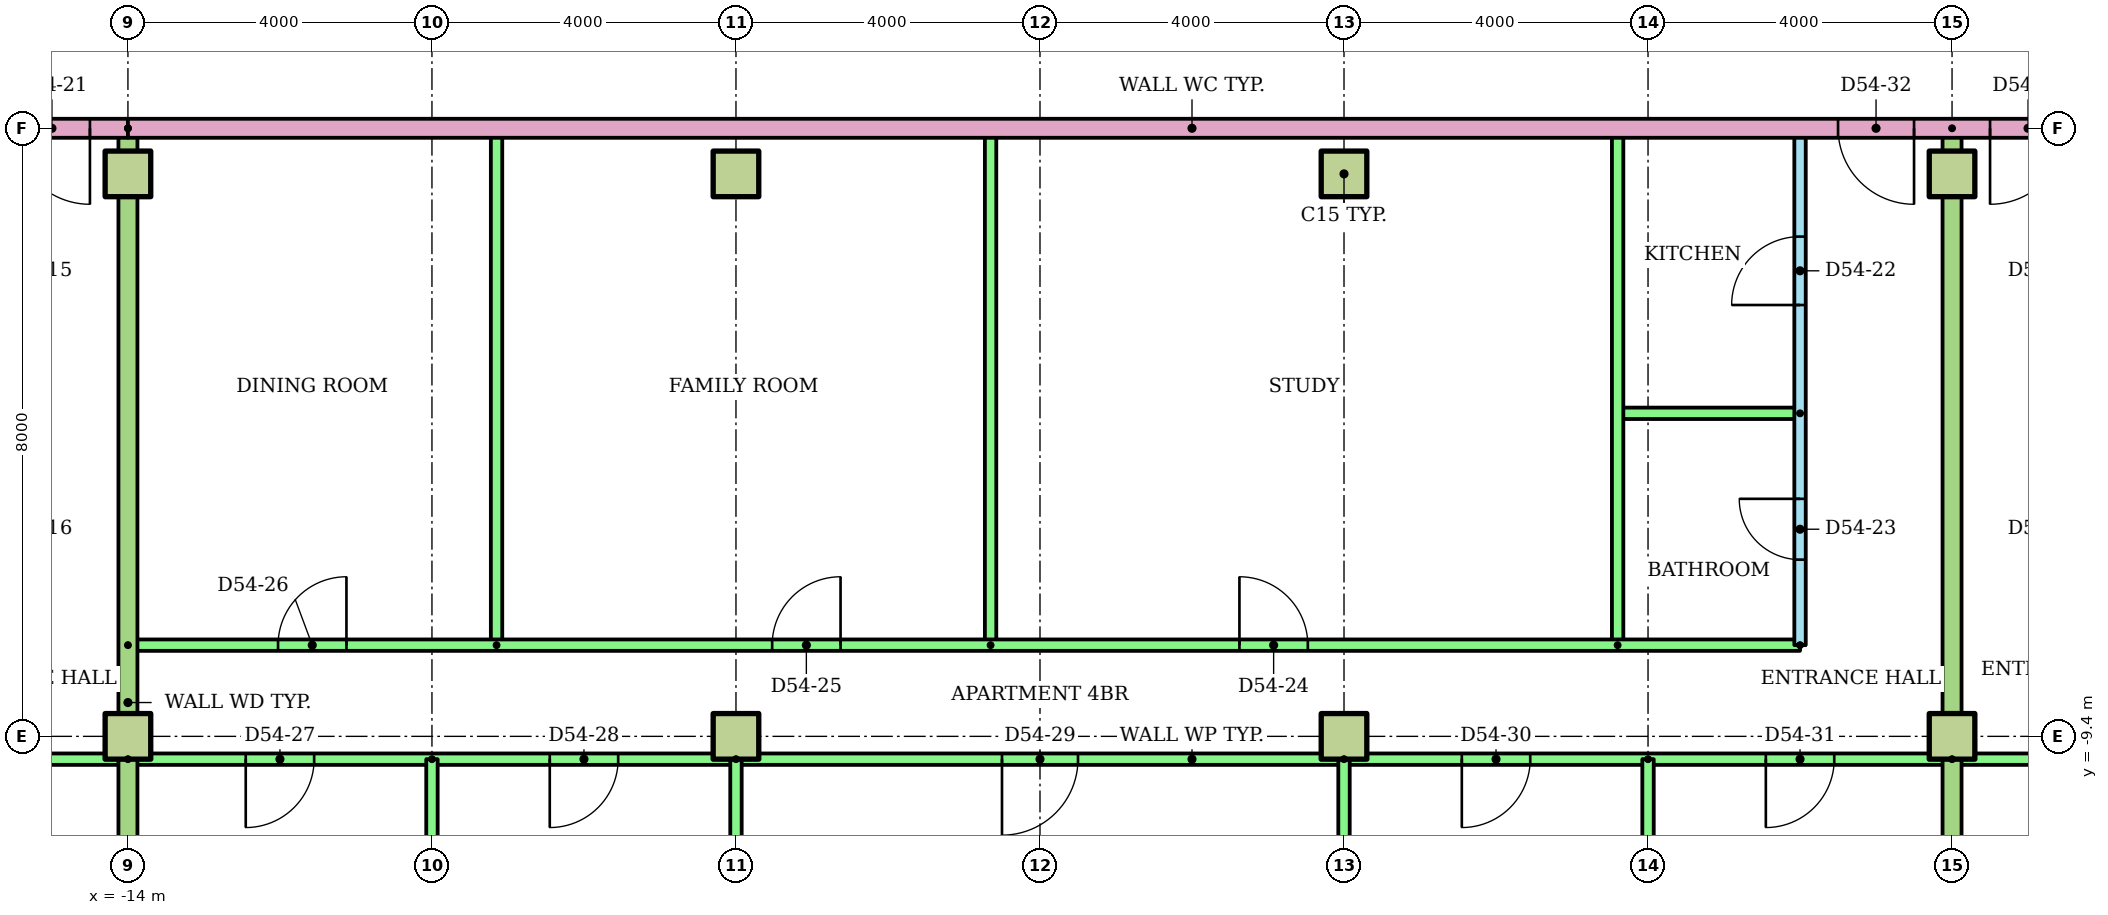
"""IFC4 building model, lengths in metres.
Left out: names, types, materials, properties, quantities, classifications, styles, units other than length and angle.
Written with IfcOpenShell. Run it as: python <this file> out.ifc"""

import sys

from ifc_helpers import new_model, si_unit, direction, frame, frame_2d, origin, origin_2d, place, context, subcontext, project, spatial, rectangle, extrude, element, fill, save


model = new_model("IFC4")
c1 = context("Model", 3, precision=1e-05, world=origin(), true_north=direction((0.0, 1.0)))
c2 = subcontext(c1, "Body", "Model", "MODEL_VIEW")
j1 = project(units=[si_unit("LENGTHUNIT", "METRE"), si_unit("PLANEANGLEUNIT", "RADIAN")], contexts=[c1])
p1 = place(None, origin())
s1 = spatial("IfcSite", under=j1, at=p1, CompositionType="ELEMENT")
p2 = place(p1, origin())
s2 = spatial("IfcBuilding", under=s1, at=p2, CompositionType="ELEMENT")
p3 = place(p2, frame((0.0, 0.0, 210.8)))
s3 = spatial("IfcBuildingStorey", under=s2, at=p3, CompositionType="ELEMENT", Elevation=210.8)
for number, where in (
    (1, (-14.0, -9.4, 0.0)),
    (2, (-6.0, -9.4, 0.0)),
    (3, (2.0, -9.4, 0.0)),
    (4, (10.0, -9.4, 0.0)),
    (5, (-14.0, -2.0, 0.0)),
    (6, (-6.0, -2.0, 0.0)),
    (7, (2.0, -2.0, 0.0)),
    (8, (10.0, -2.0, 0.0)),
):
    element("IfcColumn", number, at=place(p3, frame(where)), inside=s3, PredefinedType="COLUMN", context=c2, shape_type="SweptSolid", body=[
        extrude(rectangle(XDim=0.6, YDim=0.6, at=origin_2d()), origin(), (0.0, 0.0, 1.0), 3.2),
    ])
p4 = place(p3, frame((-14.0, -9.7, 0.0), z_axis=(0.0, 0.0, 1.0), x_axis=(-1.0, 0.0, 0.0)))
e9 = element("IfcWall", 9, at=p4, inside=s3, PredefinedType="PARTITIONING", context=c2, shape_type="SweptSolid", body=[
    extrude(rectangle(XDim=14.92, YDim=0.15, at=frame_2d((7.46, 0.0))), origin(), (0.0, 0.0, 1.0), 2.4),
])
p5 = place(p4, frame((12.0, 0.0, 0.0)))
e10 = element("IfcOpeningElement", 10, at=p5, cuts=e9, PredefinedType="OPENING", context=c2, shape_type="SweptSolid", body=[
    extrude(rectangle(XDim=0.9, YDim=2.1, at=frame_2d((0.45, 1.05))), frame((0.0, 0.085, 0.0), z_axis=(0.0, -1.0, 0.0), x_axis=(1.0, 0.0, 0.0)), (0.0, 0.0, 1.0), 0.17),
])
p6 = place(p4, frame((4.6, 0.0, 0.0)))
e11 = element("IfcOpeningElement", 11, at=p6, cuts=e9, PredefinedType="OPENING", context=c2, shape_type="SweptSolid", body=[
    extrude(rectangle(XDim=1.0, YDim=2.1, at=frame_2d((0.5, 1.05))), frame((0.0, 0.085, 0.0), z_axis=(0.0, -1.0, 0.0), x_axis=(1.0, 0.0, 0.0)), (0.0, 0.0, 1.0), 0.17),
])
p7 = place(p3, frame((8.0, -8.2, 0.0), z_axis=(0.0, 0.0, 1.0), x_axis=(0.0, 1.0, 0.0)))
e12 = element("IfcWall", 12, at=p7, inside=s3, PredefinedType="PARTITIONING", context=c2, shape_type="SweptSolid", body=[
    extrude(rectangle(XDim=6.8, YDim=0.15, at=frame_2d((3.4, 0.0))), origin(), (0.0, 0.0, 1.0), 2.4),
])
p8 = place(p7, frame((4.475, 0.0, 0.0)))
e13 = element("IfcOpeningElement", 13, at=p8, cuts=e12, PredefinedType="OPENING", context=c2, shape_type="SweptSolid", body=[
    extrude(rectangle(XDim=0.9, YDim=2.1, at=frame_2d((0.45, 1.05))), frame((0.0, 0.085, 0.0), z_axis=(0.0, -1.0, 0.0), x_axis=(1.0, 0.0, 0.0)), (0.0, 0.0, 1.0), 0.17),
])
p9 = place(p7, frame((1.125, 0.0, 0.0)))
e14 = element("IfcOpeningElement", 14, at=p9, cuts=e12, PredefinedType="OPENING", context=c2, shape_type="SweptSolid", body=[
    extrude(rectangle(XDim=0.8, YDim=2.1, at=frame_2d((0.4, 1.05))), frame((0.0, 0.085, 0.0), z_axis=(0.0, -1.0, 0.0), x_axis=(1.0, 0.0, 0.0)), (0.0, 0.0, 1.0), 0.17),
])
p10 = place(p3, frame((8.0, -5.15, 0.0), z_axis=(0.0, 0.0, 1.0), x_axis=(-1.0, 0.0, 0.0)))
e15 = element("IfcWall", 15, at=p10, inside=s3, PredefinedType="PARTITIONING", context=c2, shape_type="SweptSolid", body=[
    extrude(rectangle(XDim=2.4, YDim=0.15, at=frame_2d((1.2, 0.0))), origin(), (0.0, 0.0, 1.0), 2.4),
])
for number, where, z_axis, x_axis in (
    (16, (5.6, -8.2, 0.0), (0.0, 0.0, 1.0), (0.0, 1.0, 0.0)),
    (17, (-2.65, -8.2, 0.0), (0.0, 0.0, 1.0), (0.0, 1.0, 0.0)),
    (18, (-9.15, -8.2, 0.0), (0.0, 0.0, 1.0), (0.0, 1.0, 0.0)),
):
    element("IfcWall", number, at=place(p3, frame(where, z_axis=z_axis, x_axis=x_axis)), inside=s3, PredefinedType="PARTITIONING", context=c2, shape_type="SweptSolid", body=[
        extrude(rectangle(XDim=6.8, YDim=0.15, at=frame_2d((3.4, 0.0))), origin(), (0.0, 0.0, 1.0), 2.4),
    ])
p11 = place(p3, frame((-14.0, -8.2, 0.0)))
e19 = element("IfcWall", 19, at=p11, inside=s3, PredefinedType="PARTITIONING", context=c2, shape_type="SweptSolid", body=[
    extrude(rectangle(XDim=22.0, YDim=0.15, at=frame_2d((11.0, 0.0))), origin(), (0.0, 0.0, 1.0), 2.4),
])
p12 = place(p11, frame((14.624, 0.0, 0.0)))
e20 = element("IfcOpeningElement", 20, at=p12, cuts=e19, PredefinedType="OPENING", context=c2, shape_type="SweptSolid", body=[
    extrude(rectangle(XDim=0.9, YDim=2.1, at=frame_2d((0.45, 1.05))), frame((0.0, 0.085, 0.0), z_axis=(0.0, -1.0, 0.0), x_axis=(1.0, 0.0, 0.0)), (0.0, 0.0, 1.0), 0.17),
])
p13 = place(p11, frame((8.476, 0.0, 0.0)))
e21 = element("IfcOpeningElement", 21, at=p13, cuts=e19, PredefinedType="OPENING", context=c2, shape_type="SweptSolid", body=[
    extrude(rectangle(XDim=0.9, YDim=2.1, at=frame_2d((0.45, 1.05))), frame((0.0, 0.085, 0.0), z_axis=(0.0, -1.0, 0.0), x_axis=(1.0, 0.0, 0.0)), (0.0, 0.0, 1.0), 0.17),
])
p14 = place(p11, frame((1.975, 0.0, 0.0)))
e22 = element("IfcOpeningElement", 22, at=p14, cuts=e19, PredefinedType="OPENING", context=c2, shape_type="SweptSolid", body=[
    extrude(rectangle(XDim=0.9, YDim=2.1, at=frame_2d((0.45, 1.05))), frame((0.0, 0.085, 0.0), z_axis=(0.0, -1.0, 0.0), x_axis=(1.0, 0.0, 0.0)), (0.0, 0.0, 1.0), 0.17),
])
p15 = place(p3, frame((10.0, -9.7, 0.0), z_axis=(0.0, 0.0, 1.0), x_axis=(-1.0, 0.0, 0.0)))
e23 = element("IfcWall", 23, at=p15, inside=s3, PredefinedType="PARTITIONING", context=c2, shape_type="SweptSolid", body=[
    extrude(rectangle(XDim=24.0, YDim=0.15, at=frame_2d((12.0, 0.0))), origin(), (0.0, 0.0, 1.0), 2.4),
])
p16 = place(p15, frame((21.55, 0.0, 0.0)))
e24 = element("IfcOpeningElement", 24, at=p16, cuts=e23, PredefinedType="OPENING", context=c2, shape_type="SweptSolid", body=[
    extrude(rectangle(XDim=0.9, YDim=2.1, at=frame_2d((0.45, 1.05))), frame((0.0, 0.085, 0.0), z_axis=(0.0, -1.0, 0.0), x_axis=(1.0, 0.0, 0.0)), (0.0, 0.0, 1.0), 0.17),
])
p17 = place(p15, frame((17.55, 0.0, 0.0)))
e25 = element("IfcOpeningElement", 25, at=p17, cuts=e23, PredefinedType="OPENING", context=c2, shape_type="SweptSolid", body=[
    extrude(rectangle(XDim=0.9, YDim=2.1, at=frame_2d((0.45, 1.05))), frame((0.0, 0.085, 0.0), z_axis=(0.0, -1.0, 0.0), x_axis=(1.0, 0.0, 0.0)), (0.0, 0.0, 1.0), 0.17),
])
p18 = place(p15, frame((11.5, 0.0, 0.0)))
e26 = element("IfcOpeningElement", 26, at=p18, cuts=e23, PredefinedType="OPENING", context=c2, shape_type="SweptSolid", body=[
    extrude(rectangle(XDim=1.0, YDim=2.1, at=frame_2d((0.5, 1.05))), frame((0.0, 0.085, 0.0), z_axis=(0.0, -1.0, 0.0), x_axis=(1.0, 0.0, 0.0)), (0.0, 0.0, 1.0), 0.17),
])
p19 = place(p15, frame((5.55, 0.0, 0.0)))
e27 = element("IfcOpeningElement", 27, at=p19, cuts=e23, PredefinedType="OPENING", context=c2, shape_type="SweptSolid", body=[
    extrude(rectangle(XDim=0.9, YDim=2.1, at=frame_2d((0.45, 1.05))), frame((0.0, 0.085, 0.0), z_axis=(0.0, -1.0, 0.0), x_axis=(1.0, 0.0, 0.0)), (0.0, 0.0, 1.0), 0.17),
])
p20 = place(p15, frame((1.55, 0.0, 0.0)))
e28 = element("IfcOpeningElement", 28, at=p20, cuts=e23, PredefinedType="OPENING", context=c2, shape_type="SweptSolid", body=[
    extrude(rectangle(XDim=0.9, YDim=2.1, at=frame_2d((0.45, 1.05))), frame((0.0, 0.085, 0.0), z_axis=(0.0, -1.0, 0.0), x_axis=(1.0, 0.0, 0.0)), (0.0, 0.0, 1.0), 0.17),
])
p21 = place(p3, frame((-10.0, -9.7, 0.0), z_axis=(0.0, 0.0, 1.0), x_axis=(0.0, -1.0, 0.0)))
e29 = element("IfcWall", 29, at=p21, inside=s3, PredefinedType="PARTITIONING", context=c2, shape_type="SweptSolid", body=[
    extrude(rectangle(XDim=6.821, YDim=0.15, at=frame_2d((3.411, 0.0))), origin(), (0.0, 0.0, 1.0), 2.4),
])
for number, where, z_axis, x_axis in (
    (30, (-6.0, -9.7, 0.0), (0.0, 0.0, 1.0), (0.0, -1.0, 0.0)),
    (31, (2.0, -9.7, 0.0), (0.0, 0.0, 1.0), (0.0, -1.0, 0.0)),
):
    element("IfcWall", number, at=place(p3, frame(where, z_axis=z_axis, x_axis=x_axis)), inside=s3, PredefinedType="PARTITIONING", context=c2, shape_type="SweptSolid", body=[
        extrude(rectangle(XDim=6.81, YDim=0.15, at=frame_2d((3.405, 0.0))), origin(), (0.0, 0.0, 1.0), 2.4),
    ])
p22 = place(p3, frame((6.0, -9.7, 0.0), z_axis=(0.0, 0.0, 1.0), x_axis=(0.0, -1.0, 0.0)))
e32 = element("IfcWall", 32, at=p22, inside=s3, PredefinedType="PARTITIONING", context=c2, shape_type="SweptSolid", body=[
    extrude(rectangle(XDim=6.821, YDim=0.15, at=frame_2d((3.411, 0.0))), origin(), (0.0, 0.0, 1.0), 2.4),
])
p23 = place(p3, frame((-14.0, -1.4, 0.0), z_axis=(0.0, 0.0, 1.0), x_axis=(0.0, -1.0, 0.0)))
e33 = element("IfcWall", 33, at=p23, inside=s3, PredefinedType="PARTITIONING", context=c2, shape_type="SweptSolid", body=[
    extrude(rectangle(XDim=15.11, YDim=0.25, at=frame_2d((7.555, 0.0))), origin(), (0.0, 0.0, 1.0), 2.4),
])
p24 = place(p3, frame((18.0, -9.7, 0.0), z_axis=(0.0, 0.0, 1.0), x_axis=(-1.0, 0.0, 0.0)))
e34 = element("IfcWall", 34, at=p24, inside=s3, PredefinedType="PARTITIONING", context=c2, shape_type="SweptSolid", body=[
    extrude(rectangle(XDim=8.0, YDim=0.15, at=frame_2d((4.0, 0.0))), origin(), (0.0, 0.0, 1.0), 2.4),
])
p25 = place(p24, frame((5.55, 0.0, 0.0)))
e35 = element("IfcOpeningElement", 35, at=p25, cuts=e34, PredefinedType="OPENING", context=c2, shape_type="SweptSolid", body=[
    extrude(rectangle(XDim=0.9, YDim=2.1, at=frame_2d((0.45, 1.05))), frame((0.0, 0.085, 0.0), z_axis=(0.0, -1.0, 0.0), x_axis=(1.0, 0.0, 0.0)), (0.0, 0.0, 1.0), 0.17),
])
p26 = place(p24, frame((1.5, 0.0, 0.0)))
e36 = element("IfcOpeningElement", 36, at=p26, cuts=e34, PredefinedType="OPENING", context=c2, shape_type="SweptSolid", body=[
    extrude(rectangle(XDim=1.0, YDim=2.1, at=frame_2d((0.5, 1.05))), frame((0.0, 0.085, 0.0), z_axis=(0.0, -1.0, 0.0), x_axis=(1.0, 0.0, 0.0)), (0.0, 0.0, 1.0), 0.17),
])
p27 = place(p3, frame((10.0, -1.4, 0.0), z_axis=(0.0, 0.0, 1.0), x_axis=(0.0, -1.0, 0.0)))
e37 = element("IfcWall", 37, at=p27, inside=s3, PredefinedType="PARTITIONING", context=c2, shape_type="SweptSolid", body=[
    extrude(rectangle(XDim=15.11, YDim=0.25, at=frame_2d((7.555, 0.0))), origin(), (0.0, 0.0, 1.0), 2.4),
])
p28 = place(p3, frame((-14.0, -1.4, 0.0), z_axis=(0.0, 0.0, 1.0), x_axis=(-1.0, 0.0, 0.0)))
e38 = element("IfcWall", 38, at=p28, inside=s3, PredefinedType="PARTITIONING", context=c2, shape_type="SweptSolid", body=[
    extrude(rectangle(XDim=14.92, YDim=0.25, at=frame_2d((7.46, 0.0))), origin(), (0.0, 0.0, 1.0), 2.4),
])
p29 = place(p28, frame((0.5, 0.0, 0.0)))
e39 = element("IfcOpeningElement", 39, at=p29, cuts=e38, PredefinedType="OPENING", context=c2, shape_type="SweptSolid", body=[
    extrude(rectangle(XDim=1.0, YDim=2.1, at=frame_2d((0.5, 1.05))), frame((0.0, 0.135, 0.0), z_axis=(0.0, -1.0, 0.0), x_axis=(1.0, 0.0, 0.0)), (0.0, 0.0, 1.0), 0.27),
])
p30 = place(p3, frame((14.0, -1.4, 0.0), z_axis=(0.0, 0.0, 1.0), x_axis=(-1.0, 0.0, 0.0)))
e40 = element("IfcWall", 40, at=p30, inside=s3, PredefinedType="PARTITIONING", context=c2, shape_type="SweptSolid", body=[
    extrude(rectangle(XDim=28.0, YDim=0.25, at=frame_2d((14.0, 0.0))), origin(), (0.0, 0.0, 1.0), 2.4),
])
p31 = place(p30, frame((4.5, 0.0, 0.0)))
e41 = element("IfcOpeningElement", 41, at=p31, cuts=e40, PredefinedType="OPENING", context=c2, shape_type="SweptSolid", body=[
    extrude(rectangle(XDim=1.0, YDim=2.1, at=frame_2d((0.5, 1.05))), frame((0.0, 0.135, 0.0), z_axis=(0.0, -1.0, 0.0), x_axis=(1.0, 0.0, 0.0)), (0.0, 0.0, 1.0), 0.27),
])
p32 = place(p30, frame((2.5, 0.0, 0.0)))
e42 = element("IfcOpeningElement", 42, at=p32, cuts=e40, PredefinedType="OPENING", context=c2, shape_type="SweptSolid", body=[
    extrude(rectangle(XDim=1.0, YDim=2.1, at=frame_2d((0.5, 1.05))), frame((0.0, 0.135, 0.0), z_axis=(0.0, -1.0, 0.0), x_axis=(1.0, 0.0, 0.0)), (0.0, 0.0, 1.0), 0.27),
])
p33 = place(p29, origin())
e43 = element("IfcDoor", 43, at=p33, inside=s3, OperationType="SINGLE_SWING_LEFT", PredefinedType="DOOR", context=c2, shape_type="SweptSolid", body=[
    extrude(rectangle(XDim=1.0, YDim=2.1, at=frame_2d((0.5, 1.05))), frame((0.0, 0.025, 0.0), z_axis=(0.0, -1.0, 0.0), x_axis=(1.0, 0.0, 0.0)), (0.0, 0.0, 1.0), 0.05),
])
fill(e39, e43)
p34 = place(p8, origin())
e44 = element("IfcDoor", 44, at=p34, inside=s3, OperationType="SINGLE_SWING_LEFT", PredefinedType="DOOR", context=c2, shape_type="SweptSolid", body=[
    extrude(rectangle(XDim=0.9, YDim=2.1, at=frame_2d((0.45, 1.05))), frame((0.0, 0.025, 0.0), z_axis=(0.0, -1.0, 0.0), x_axis=(1.0, 0.0, 0.0)), (0.0, 0.0, 1.0), 0.05),
])
fill(e13, e44)
p35 = place(p9, origin())
e45 = element("IfcDoor", 45, at=p35, inside=s3, OperationType="SINGLE_SWING_RIGHT", PredefinedType="DOOR", context=c2, shape_type="SweptSolid", body=[
    extrude(rectangle(XDim=0.8, YDim=2.1, at=frame_2d((0.4, 1.05))), frame((0.0, 0.025, 0.0), z_axis=(0.0, -1.0, 0.0), x_axis=(1.0, 0.0, 0.0)), (0.0, 0.0, 1.0), 0.05),
])
fill(e14, e45)
p36 = place(p12, origin())
e46 = element("IfcDoor", 46, at=p36, inside=s3, OperationType="SINGLE_SWING_LEFT", PredefinedType="DOOR", context=c2, shape_type="SweptSolid", body=[
    extrude(rectangle(XDim=0.9, YDim=2.1, at=frame_2d((0.45, 1.05))), frame((0.0, 0.025, 0.0), z_axis=(0.0, -1.0, 0.0), x_axis=(1.0, 0.0, 0.0)), (0.0, 0.0, 1.0), 0.05),
])
fill(e20, e46)
p37 = place(p13, origin())
e47 = element("IfcDoor", 47, at=p37, inside=s3, OperationType="SINGLE_SWING_RIGHT", PredefinedType="DOOR", context=c2, shape_type="SweptSolid", body=[
    extrude(rectangle(XDim=0.9, YDim=2.1, at=frame_2d((0.45, 1.05))), frame((0.0, 0.025, 0.0), z_axis=(0.0, -1.0, 0.0), x_axis=(1.0, 0.0, 0.0)), (0.0, 0.0, 1.0), 0.05),
])
fill(e21, e47)
p38 = place(p14, origin())
e48 = element("IfcDoor", 48, at=p38, inside=s3, OperationType="SINGLE_SWING_RIGHT", PredefinedType="DOOR", context=c2, shape_type="SweptSolid", body=[
    extrude(rectangle(XDim=0.9, YDim=2.1, at=frame_2d((0.45, 1.05))), frame((0.0, 0.025, 0.0), z_axis=(0.0, -1.0, 0.0), x_axis=(1.0, 0.0, 0.0)), (0.0, 0.0, 1.0), 0.05),
])
fill(e22, e48)
p39 = place(p16, origin())
e49 = element("IfcDoor", 49, at=p39, inside=s3, OperationType="SINGLE_SWING_RIGHT", PredefinedType="DOOR", context=c2, shape_type="SweptSolid", body=[
    extrude(rectangle(XDim=0.9, YDim=2.1, at=frame_2d((0.45, 1.05))), frame((0.0, 0.025, 0.0), z_axis=(0.0, -1.0, 0.0), x_axis=(1.0, 0.0, 0.0)), (0.0, 0.0, 1.0), 0.05),
])
fill(e24, e49)
p40 = place(p17, origin())
e50 = element("IfcDoor", 50, at=p40, inside=s3, OperationType="SINGLE_SWING_RIGHT", PredefinedType="DOOR", context=c2, shape_type="SweptSolid", body=[
    extrude(rectangle(XDim=0.9, YDim=2.1, at=frame_2d((0.45, 1.05))), frame((0.0, 0.025, 0.0), z_axis=(0.0, -1.0, 0.0), x_axis=(1.0, 0.0, 0.0)), (0.0, 0.0, 1.0), 0.05),
])
fill(e25, e50)
p41 = place(p18, origin())
e51 = element("IfcDoor", 51, at=p41, inside=s3, OperationType="SINGLE_SWING_RIGHT", PredefinedType="DOOR", context=c2, shape_type="SweptSolid", body=[
    extrude(rectangle(XDim=1.0, YDim=2.1, at=frame_2d((0.5, 1.05))), frame((0.0, 0.025, 0.0), z_axis=(0.0, -1.0, 0.0), x_axis=(1.0, 0.0, 0.0)), (0.0, 0.0, 1.0), 0.05),
])
fill(e26, e51)
p42 = place(p19, origin())
e52 = element("IfcDoor", 52, at=p42, inside=s3, OperationType="SINGLE_SWING_RIGHT", PredefinedType="DOOR", context=c2, shape_type="SweptSolid", body=[
    extrude(rectangle(XDim=0.9, YDim=2.1, at=frame_2d((0.45, 1.05))), frame((0.0, 0.025, 0.0), z_axis=(0.0, -1.0, 0.0), x_axis=(1.0, 0.0, 0.0)), (0.0, 0.0, 1.0), 0.05),
])
fill(e27, e52)
p43 = place(p20, origin())
e53 = element("IfcDoor", 53, at=p43, inside=s3, OperationType="SINGLE_SWING_RIGHT", PredefinedType="DOOR", context=c2, shape_type="SweptSolid", body=[
    extrude(rectangle(XDim=0.9, YDim=2.1, at=frame_2d((0.45, 1.05))), frame((0.0, 0.025, 0.0), z_axis=(0.0, -1.0, 0.0), x_axis=(1.0, 0.0, 0.0)), (0.0, 0.0, 1.0), 0.05),
])
fill(e28, e53)
p44 = place(p31, origin())
e54 = element("IfcDoor", 54, at=p44, inside=s3, OperationType="SINGLE_SWING_LEFT", PredefinedType="DOOR", context=c2, shape_type="SweptSolid", body=[
    extrude(rectangle(XDim=1.0, YDim=2.1, at=frame_2d((0.5, 1.05))), frame((0.0, 0.025, 0.0), z_axis=(0.0, -1.0, 0.0), x_axis=(1.0, 0.0, 0.0)), (0.0, 0.0, 1.0), 0.05),
])
fill(e41, e54)
p45 = place(p32, origin())
e55 = element("IfcDoor", 55, at=p45, inside=s3, OperationType="SINGLE_SWING_RIGHT", PredefinedType="DOOR", context=c2, shape_type="SweptSolid", body=[
    extrude(rectangle(XDim=1.0, YDim=2.1, at=frame_2d((0.5, 1.05))), frame((0.0, 0.025, 0.0), z_axis=(0.0, -1.0, 0.0), x_axis=(1.0, 0.0, 0.0)), (0.0, 0.0, 1.0), 0.05),
])
fill(e42, e55)
save(model, sys.argv[1])
